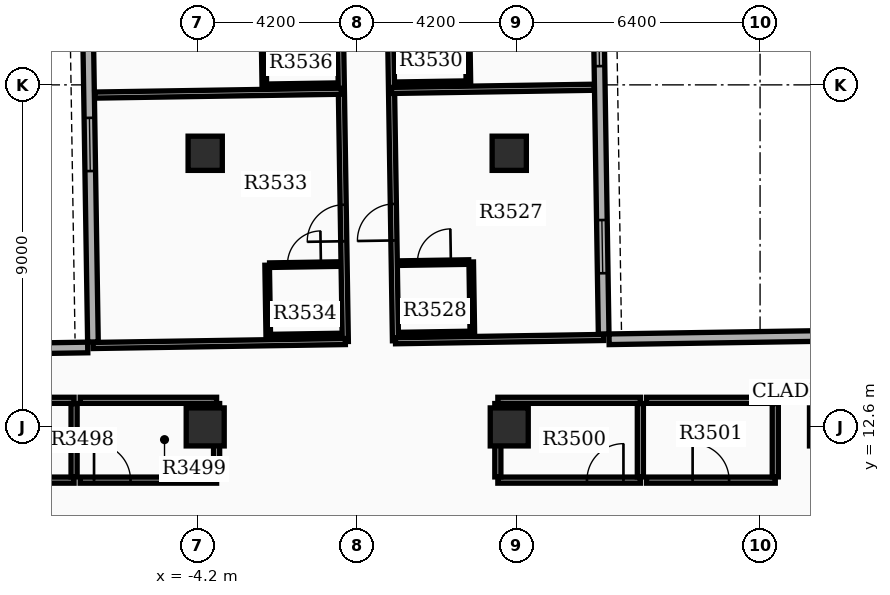
"""IFC4 building model, lengths in metres.
Left out: names, types, materials, properties, quantities, classifications, styles, units other than length and angle.
Written with IfcOpenShell. Run it as: python <this file> out.ifc"""

import sys

from ifc_helpers import new_model, si_unit, direction, frame, frame_2d, origin, origin_2d, place, context, subcontext, project, spatial, rectangle, extrude, element, fill, save


model = new_model("IFC4")
c1 = context("Model", 3, precision=1e-05, world=origin(), true_north=direction((0.0, 1.0)))
c2 = subcontext(c1, "Body", "Model", "MODEL_VIEW")
j1 = project(units=[si_unit("LENGTHUNIT", "METRE"), si_unit("PLANEANGLEUNIT", "RADIAN")], contexts=[c1])
p1 = place(None, origin())
s1 = spatial("IfcSite", under=j1, at=p1, CompositionType="ELEMENT")
p2 = place(p1, origin())
s2 = spatial("IfcBuilding", under=s1, at=p2, CompositionType="ELEMENT")
p3 = place(p2, frame((0.0, 0.0, 220.8)))
s3 = spatial("IfcBuildingStorey", under=s2, at=p3, CompositionType="ELEMENT", Elevation=220.8)
for number, where, z_axis, x_axis in (
    (1, (12.4, 12.6, 0.0), (0.0, 0.0, 1.0), (1.0, 0.0, 0.0)),
    (2, (4.0, 12.6, 0.0), (0.0, 0.0, 1.0), (1.0, 0.0, 0.0)),
    (3, (-4.0, 12.6, 0.0), (0.0, 0.0, 1.0), (1.0, 0.0, 0.0)),
):
    element("IfcColumn", number, at=place(p3, frame(where, z_axis=z_axis, x_axis=x_axis)), inside=s3, PredefinedType="COLUMN", context=c2, shape_type="SweptSolid", body=[
        extrude(rectangle(XDim=1.0, YDim=1.0, at=origin_2d()), origin(), (0.0, 0.0, 1.0), 3.9),
    ])
for number, where, z_axis, x_axis in (
    (4, (-4.0, 19.8, 0.0), (0.0, 0.0, 1.0), (1.0, 0.0, 0.0)),
    (5, (4.0, 19.8, 0.0), (0.0, 0.0, 1.0), (1.0, 0.0, 0.0)),
):
    element("IfcColumn", number, at=place(p3, frame(where, z_axis=z_axis, x_axis=x_axis)), inside=s3, PredefinedType="COLUMN", context=c2, shape_type="SweptSolid", body=[
        extrude(rectangle(XDim=0.9, YDim=0.9, at=origin_2d()), origin(), (0.0, 0.0, 1.0), 3.9),
    ])
p4 = place(p3, frame((6.485, 15.044, 0.0), z_axis=(0.0, 0.0, 1.0), x_axis=(-0.01571739401, 0.999876474133, 0.0)))
e6 = element("IfcWall", 6, at=p4, inside=s3, PredefinedType="STANDARD", context=c2, shape_type="SweptSolid", body=[
    extrude(rectangle(XDim=20.1, YDim=0.28, at=frame_2d((10.05, 0.0))), origin(), (0.0, 0.0, 1.0), 3.18),
])
p5 = place(p4, frame((1.6, 0.0, 0.8)))
e7 = element("IfcOpeningElement", 7, at=p5, cuts=e6, PredefinedType="OPENING", context=c2, shape_type="SweptSolid", body=[
    extrude(rectangle(XDim=1.4, YDim=1.6, at=frame_2d((0.7, 0.8))), frame((0.0, 0.15, 0.0), z_axis=(0.0, -1.0, 0.0), x_axis=(1.0, 0.0, 0.0)), (0.0, 0.0, 1.0), 0.3),
])
p6 = place(p4, frame((7.05, 0.0, 0.8)))
e8 = element("IfcOpeningElement", 8, at=p6, cuts=e6, PredefinedType="OPENING", context=c2, shape_type="SweptSolid", body=[
    extrude(rectangle(XDim=1.4, YDim=1.6, at=frame_2d((0.7, 0.8))), frame((0.0, 0.15, 0.0), z_axis=(0.0, -1.0, 0.0), x_axis=(1.0, 0.0, 0.0)), (0.0, 0.0, 1.0), 0.3),
])
p7 = place(p4, frame((10.25, 0.0, 0.8)))
e9 = element("IfcOpeningElement", 9, at=p7, cuts=e6, PredefinedType="OPENING", context=c2, shape_type="SweptSolid", body=[
    extrude(rectangle(XDim=1.4, YDim=1.6, at=frame_2d((0.7, 0.8))), frame((0.0, 0.15, 0.0), z_axis=(0.0, -1.0, 0.0), x_axis=(1.0, 0.0, 0.0)), (0.0, 0.0, 1.0), 0.3),
])
p8 = place(p4, frame((14.2, 0.0, 0.8)))
e10 = element("IfcOpeningElement", 10, at=p8, cuts=e6, PredefinedType="OPENING", context=c2, shape_type="SweptSolid", body=[
    extrude(rectangle(XDim=1.4, YDim=1.6, at=frame_2d((0.7, 0.8))), frame((0.0, 0.15, 0.0), z_axis=(0.0, -1.0, 0.0), x_axis=(1.0, 0.0, 0.0)), (0.0, 0.0, 1.0), 0.3),
])
p9 = place(p3, frame((-7.27, 34.93, 0.0), z_axis=(0.0, 0.0, 1.0), x_axis=(0.015705059908, -0.999876667941, 0.0)))
e11 = element("IfcWall", 11, at=p9, inside=s3, PredefinedType="STANDARD", context=c2, shape_type="SweptSolid", body=[
    extrude(rectangle(XDim=20.1, YDim=0.28, at=frame_2d((10.05, 0.0))), origin(), (0.0, 0.0, 1.0), 3.18),
])
p10 = place(p9, frame((1.6, 0.0, 0.8)))
e12 = element("IfcOpeningElement", 12, at=p10, cuts=e11, PredefinedType="OPENING", context=c2, shape_type="SweptSolid", body=[
    extrude(rectangle(XDim=1.4, YDim=1.6, at=frame_2d((0.7, 0.8))), frame((0.0, 0.15, 0.0), z_axis=(0.0, -1.0, 0.0), x_axis=(1.0, 0.0, 0.0)), (0.0, 0.0, 1.0), 0.3),
])
p11 = place(p9, frame((7.05, 0.0, 0.8)))
e13 = element("IfcOpeningElement", 13, at=p11, cuts=e11, PredefinedType="OPENING", context=c2, shape_type="SweptSolid", body=[
    extrude(rectangle(XDim=1.4, YDim=1.6, at=frame_2d((0.7, 0.8))), frame((0.0, 0.15, 0.0), z_axis=(0.0, -1.0, 0.0), x_axis=(1.0, 0.0, 0.0)), (0.0, 0.0, 1.0), 0.3),
])
p12 = place(p9, frame((10.25, 0.0, 0.8)))
e14 = element("IfcOpeningElement", 14, at=p12, cuts=e11, PredefinedType="OPENING", context=c2, shape_type="SweptSolid", body=[
    extrude(rectangle(XDim=1.4, YDim=1.6, at=frame_2d((0.7, 0.8))), frame((0.0, 0.15, 0.0), z_axis=(0.0, -1.0, 0.0), x_axis=(1.0, 0.0, 0.0)), (0.0, 0.0, 1.0), 0.3),
])
p13 = place(p9, frame((14.2, 0.0, 0.8)))
e15 = element("IfcOpeningElement", 15, at=p13, cuts=e11, PredefinedType="OPENING", context=c2, shape_type="SweptSolid", body=[
    extrude(rectangle(XDim=1.4, YDim=1.6, at=frame_2d((0.7, 0.8))), frame((0.0, 0.15, 0.0), z_axis=(0.0, -1.0, 0.0), x_axis=(1.0, 0.0, 0.0)), (0.0, 0.0, 1.0), 0.3),
])
p14 = place(p3, frame((12.926, 15.005, 0.0), z_axis=(0.0, 0.0, 1.0), x_axis=(-0.999876823822, -0.015695132501, 0.0)))
e16 = element("IfcWall", 16, at=p14, inside=s3, PredefinedType="STANDARD", context=c2, shape_type="SweptSolid", body=[
    extrude(rectangle(XDim=6.3, YDim=0.28, at=frame_2d((3.15, 0.0))), origin(), (0.0, 0.0, 1.0), 3.18),
])
p15 = place(p3, frame((-13.391, 14.592, 0.0), z_axis=(0.0, 0.0, 1.0), x_axis=(0.999876833368, 0.015694524359, 0.0)))
e17 = element("IfcWall", 17, at=p15, inside=s3, PredefinedType="STANDARD", context=c2, shape_type="SweptSolid", body=[
    extrude(rectangle(XDim=6.3, YDim=0.28, at=frame_2d((3.15, 0.0))), origin(), (0.0, 0.0, 1.0), 3.18),
])
p16 = place(p3, frame((-11.0, 11.2, 0.0), z_axis=(0.0, 0.0, 1.0), x_axis=(1.0, 0.0, 0.0)))
e18 = element("IfcWall", 18, at=p16, inside=s3, PredefinedType="PARTITIONING", context=c2, shape_type="SweptSolid", body=[
    extrude(rectangle(XDim=3.55, YDim=0.16, at=frame_2d((1.775, 0.0))), origin(), (0.0, 0.0, 1.0), 3.17),
])
p17 = place(p16, frame((1.295, 0.0, 0.0)))
e19 = element("IfcOpeningElement", 19, at=p17, cuts=e18, PredefinedType="OPENING", context=c2, shape_type="SweptSolid", body=[
    extrude(rectangle(XDim=0.96, YDim=2.15, at=frame_2d((0.48, 1.075))), frame((0.0, 0.09, 0.0), z_axis=(0.0, -1.0, 0.0), x_axis=(1.0, 0.0, 0.0)), (0.0, 0.0, 1.0), 0.18),
])
p18 = place(p3, frame((-11.0, 13.3, 0.0), z_axis=(0.0, 0.0, 1.0), x_axis=(1.0, 0.0, 0.0)))
e20 = element("IfcWall", 20, at=p18, inside=s3, PredefinedType="PARTITIONING", context=c2, shape_type="SweptSolid", body=[
    extrude(rectangle(XDim=3.55, YDim=0.16, at=frame_2d((1.775, 0.0))), origin(), (0.0, 0.0, 1.0), 3.17),
])
p19 = place(p3, frame((-7.45, 11.285, 0.0), z_axis=(0.0, 0.0, 1.0), x_axis=(0.0, 1.0, 0.0)))
e21 = element("IfcWall", 21, at=p19, inside=s3, PredefinedType="PARTITIONING", context=c2, shape_type="SweptSolid", body=[
    extrude(rectangle(XDim=1.93, YDim=0.16, at=frame_2d((0.965, 0.0))), origin(), (0.0, 0.0, 1.0), 3.17),
])
p20 = place(p3, frame((-7.29, 11.2, 0.0), z_axis=(0.0, 0.0, 1.0), x_axis=(1.0, 0.0, 0.0)))
e22 = element("IfcWall", 22, at=p20, inside=s3, PredefinedType="PARTITIONING", context=c2, shape_type="SweptSolid", body=[
    extrude(rectangle(XDim=3.59, YDim=0.16, at=frame_2d((1.795, 0.0))), origin(), (0.0, 0.0, 1.0), 3.17),
])
p21 = place(p20, frame((0.365, 0.0, 0.0)))
e23 = element("IfcOpeningElement", 23, at=p21, cuts=e22, PredefinedType="OPENING", context=c2, shape_type="SweptSolid", body=[
    extrude(rectangle(XDim=0.96, YDim=2.15, at=frame_2d((0.48, 1.075))), frame((0.0, 0.09, 0.0), z_axis=(0.0, -1.0, 0.0), x_axis=(1.0, 0.0, 0.0)), (0.0, 0.0, 1.0), 0.18),
])
p22 = place(p3, frame((-7.29, 13.3, 0.0), z_axis=(0.0, 0.0, 1.0), x_axis=(1.0, 0.0, 0.0)))
e24 = element("IfcWall", 24, at=p22, inside=s3, PredefinedType="PARTITIONING", context=c2, shape_type="SweptSolid", body=[
    extrude(rectangle(XDim=3.59, YDim=0.16, at=frame_2d((1.795, 0.0))), origin(), (0.0, 0.0, 1.0), 3.17),
])
p23 = place(p3, frame((-3.7, 11.285, 0.0), z_axis=(0.0, 0.0, 1.0), x_axis=(0.0, 1.0, 0.0)))
e25 = element("IfcWall", 25, at=p23, inside=s3, PredefinedType="PARTITIONING", context=c2, shape_type="SweptSolid", body=[
    extrude(rectangle(XDim=1.93, YDim=0.16, at=frame_2d((0.965, 0.0))), origin(), (0.0, 0.0, 1.0), 3.17),
])
p24 = place(p3, frame((3.7, 11.2, 0.0), z_axis=(0.0, 0.0, 1.0), x_axis=(1.0, 0.0, 0.0)))
e26 = element("IfcWall", 26, at=p24, inside=s3, PredefinedType="PARTITIONING", context=c2, shape_type="SweptSolid", body=[
    extrude(rectangle(XDim=3.75, YDim=0.16, at=frame_2d((1.875, 0.0))), origin(), (0.0, 0.0, 1.0), 3.17),
])
p25 = place(p24, frame((2.345, 0.0, 0.0)))
e27 = element("IfcOpeningElement", 27, at=p25, cuts=e26, PredefinedType="OPENING", context=c2, shape_type="SweptSolid", body=[
    extrude(rectangle(XDim=0.96, YDim=2.15, at=frame_2d((0.48, 1.075))), frame((0.0, 0.09, 0.0), z_axis=(0.0, -1.0, 0.0), x_axis=(1.0, 0.0, 0.0)), (0.0, 0.0, 1.0), 0.18),
])
p26 = place(p3, frame((3.7, 13.3, 0.0), z_axis=(0.0, 0.0, 1.0), x_axis=(1.0, 0.0, 0.0)))
e28 = element("IfcWall", 28, at=p26, inside=s3, PredefinedType="PARTITIONING", context=c2, shape_type="SweptSolid", body=[
    extrude(rectangle(XDim=3.75, YDim=0.16, at=frame_2d((1.875, 0.0))), origin(), (0.0, 0.0, 1.0), 3.17),
])
for number, where, z_axis, x_axis in (
    (29, (3.7, 11.285, 0.0), (0.0, 0.0, 1.0), (0.0, 1.0, 0.0)),
    (30, (7.45, 11.285, 0.0), (0.0, 0.0, 1.0), (0.0, 1.0, 0.0)),
):
    element("IfcWall", number, at=place(p3, frame(where, z_axis=z_axis, x_axis=x_axis)), inside=s3, PredefinedType="PARTITIONING", context=c2, shape_type="SweptSolid", body=[
        extrude(rectangle(XDim=1.93, YDim=0.16, at=frame_2d((0.965, 0.0))), origin(), (0.0, 0.0, 1.0), 3.17),
    ])
p27 = place(p3, frame((7.61, 11.2, 0.0), z_axis=(0.0, 0.0, 1.0), x_axis=(1.0, 0.0, 0.0)))
e31 = element("IfcWall", 31, at=p27, inside=s3, PredefinedType="PARTITIONING", context=c2, shape_type="SweptSolid", body=[
    extrude(rectangle(XDim=3.39, YDim=0.16, at=frame_2d((1.695, 0.0))), origin(), (0.0, 0.0, 1.0), 3.17),
])
p28 = place(p27, frame((1.215, 0.0, 0.0)))
e32 = element("IfcOpeningElement", 32, at=p28, cuts=e31, PredefinedType="OPENING", context=c2, shape_type="SweptSolid", body=[
    extrude(rectangle(XDim=0.96, YDim=2.15, at=frame_2d((0.48, 1.075))), frame((0.0, 0.09, 0.0), z_axis=(0.0, -1.0, 0.0), x_axis=(1.0, 0.0, 0.0)), (0.0, 0.0, 1.0), 0.18),
])
p29 = place(p3, frame((7.61, 13.3, 0.0), z_axis=(0.0, 0.0, 1.0), x_axis=(1.0, 0.0, 0.0)))
e33 = element("IfcWall", 33, at=p29, inside=s3, PredefinedType="PARTITIONING", context=c2, shape_type="SweptSolid", body=[
    extrude(rectangle(XDim=3.39, YDim=0.16, at=frame_2d((1.695, 0.0))), origin(), (0.0, 0.0, 1.0), 3.17),
])
p30 = place(p3, frame((11.0, 11.285, 0.0), z_axis=(0.0, 0.0, 1.0), x_axis=(0.0, 1.0, 0.0)))
e34 = element("IfcWall", 34, at=p30, inside=s3, PredefinedType="PARTITIONING", context=c2, shape_type="SweptSolid", body=[
    extrude(rectangle(XDim=1.93, YDim=0.16, at=frame_2d((0.965, 0.0))), origin(), (0.0, 0.0, 1.0), 3.17),
])
p31 = place(p3, frame((1.007, 14.868, 0.0), z_axis=(0.0, 0.0, 1.0), x_axis=(-0.015701893165, 0.999876717676, 0.0)))
e35 = element("IfcWall", 35, at=p31, inside=s3, PredefinedType="PARTITIONING", context=c2, shape_type="SweptSolid", body=[
    extrude(rectangle(XDim=20.182, YDim=0.16, at=frame_2d((10.091, 0.0))), origin(), (0.0, 0.0, 1.0), 3.17),
])
p32 = place(p31, frame((2.639, 0.0, 0.0)))
e36 = element("IfcOpeningElement", 36, at=p32, cuts=e35, PredefinedType="OPENING", context=c2, shape_type="SweptSolid", body=[
    extrude(rectangle(XDim=0.96, YDim=2.15, at=frame_2d((0.48, 1.075))), frame((0.0, 0.09, 0.0), z_axis=(0.0, -1.0, 0.0), x_axis=(1.0, 0.0, 0.0)), (0.0, 0.0, 1.0), 0.18),
])
p33 = place(p31, frame((9.273, 0.0, 0.0)))
e37 = element("IfcOpeningElement", 37, at=p33, cuts=e35, PredefinedType="OPENING", context=c2, shape_type="SweptSolid", body=[
    extrude(rectangle(XDim=0.96, YDim=2.15, at=frame_2d((0.48, 1.075))), frame((0.0, 0.09, 0.0), z_axis=(0.0, -1.0, 0.0), x_axis=(1.0, 0.0, 0.0)), (0.0, 0.0, 1.0), 0.18),
])
p34 = place(p31, frame((16.614, 0.0, 0.0)))
e38 = element("IfcOpeningElement", 38, at=p34, cuts=e35, PredefinedType="OPENING", context=c2, shape_type="SweptSolid", body=[
    extrude(rectangle(XDim=0.96, YDim=2.15, at=frame_2d((0.48, 1.075))), frame((0.0, 0.09, 0.0), z_axis=(0.0, -1.0, 0.0), x_axis=(1.0, 0.0, 0.0)), (0.0, 0.0, 1.0), 0.18),
])
p35 = place(p3, frame((1.007, 14.868, 0.0), z_axis=(0.0, 0.0, 1.0), x_axis=(0.999877025973, 0.015682248948, 0.0)))
e39 = element("IfcWall", 39, at=p35, inside=s3, PredefinedType="PARTITIONING", context=c2, shape_type="SweptSolid", body=[
    extrude(rectangle(XDim=5.48, YDim=0.16, at=frame_2d((2.74, 0.0))), origin(), (0.0, 0.0, 1.0), 3.17),
])
p36 = place(p3, frame((0.903, 21.454, 0.0), z_axis=(0.0, 0.0, 1.0), x_axis=(0.999876674701, 0.015704629518, 0.0)))
e40 = element("IfcWall", 40, at=p36, inside=s3, PredefinedType="PARTITIONING", context=c2, shape_type="SweptSolid", body=[
    extrude(rectangle(XDim=5.332, YDim=0.16, at=frame_2d((2.666, 0.0))), origin(), (0.0, 0.0, 1.0), 3.17),
])
p37 = place(p3, frame((1.115, 16.91, 0.0), z_axis=(0.0, 0.0, 1.0), x_axis=(0.999876836305, 0.015694337248, 0.0)))
e41 = element("IfcWall", 41, at=p37, inside=s3, PredefinedType="PARTITIONING", context=c2, shape_type="SweptSolid", body=[
    extrude(rectangle(XDim=1.82, YDim=0.12, at=frame_2d((0.91, 0.0))), origin(), (0.0, 0.0, 1.0), 3.17),
])
p38 = place(p37, frame((0.47, 0.0, 0.0)))
e42 = element("IfcOpeningElement", 42, at=p38, cuts=e41, PredefinedType="OPENING", context=c2, shape_type="SweptSolid", body=[
    extrude(rectangle(XDim=0.88, YDim=2.1, at=frame_2d((0.44, 1.05))), frame((0.0, 0.07, 0.0), z_axis=(0.0, -1.0, 0.0), x_axis=(1.0, 0.0, 0.0)), (0.0, 0.0, 1.0), 0.14),
])
p39 = place(p3, frame((1.144, 15.03, 0.0), z_axis=(0.0, 0.0, 1.0), x_axis=(0.999876836305, 0.015694337248, 0.0)))
e43 = element("IfcWall", 43, at=p39, inside=s3, PredefinedType="PARTITIONING", context=c2, shape_type="SweptSolid", body=[
    extrude(rectangle(XDim=1.82, YDim=0.12, at=frame_2d((0.91, 0.0))), origin(), (0.0, 0.0, 1.0), 3.17),
])
p40 = place(p3, frame((3.029, 15.059, 0.0), z_axis=(0.0, 0.0, 1.0), x_axis=(-0.01571234584, 0.999876553475, 0.0)))
e44 = element("IfcWall", 44, at=p40, inside=s3, PredefinedType="PARTITIONING", context=c2, shape_type="SweptSolid", body=[
    extrude(rectangle(XDim=1.88, YDim=0.12, at=frame_2d((0.94, 0.0))), origin(), (0.0, 0.0, 1.0), 3.17),
])
p41 = place(p3, frame((1.041, 21.616, 0.0), z_axis=(0.0, 0.0, 1.0), x_axis=(0.999876836305, 0.015694337248, 0.0)))
e45 = element("IfcWall", 45, at=p41, inside=s3, PredefinedType="PARTITIONING", context=c2, shape_type="SweptSolid", body=[
    extrude(rectangle(XDim=1.82, YDim=0.12, at=frame_2d((0.91, 0.0))), origin(), (0.0, 0.0, 1.0), 3.17),
])
p42 = place(p3, frame((2.925, 21.646, 0.0), z_axis=(0.0, 0.0, 1.0), x_axis=(-0.01571234584, 0.999876553475, 0.0)))
e46 = element("IfcWall", 46, at=p42, inside=s3, PredefinedType="PARTITIONING", context=c2, shape_type="SweptSolid", body=[
    extrude(rectangle(XDim=1.88, YDim=0.12, at=frame_2d((0.94, 0.0))), origin(), (0.0, 0.0, 1.0), 3.17),
])
p43 = place(p3, frame((-0.313, 14.847, 0.0), z_axis=(0.0, 0.0, 1.0), x_axis=(-0.015713987169, 0.999876527681, 0.0)))
e47 = element("IfcWall", 47, at=p43, inside=s3, PredefinedType="PARTITIONING", context=c2, shape_type="SweptSolid", body=[
    extrude(rectangle(XDim=20.182, YDim=0.16, at=frame_2d((10.091, 0.0))), origin(), (0.0, 0.0, 1.0), 3.17),
])
p44 = place(p43, frame((2.639, 0.0, 0.0)))
e48 = element("IfcOpeningElement", 48, at=p44, cuts=e47, PredefinedType="OPENING", context=c2, shape_type="SweptSolid", body=[
    extrude(rectangle(XDim=0.96, YDim=2.15, at=frame_2d((0.48, 1.075))), frame((0.0, 0.09, 0.0), z_axis=(0.0, -1.0, 0.0), x_axis=(1.0, 0.0, 0.0)), (0.0, 0.0, 1.0), 0.18),
])
p45 = place(p43, frame((9.273, 0.0, 0.0)))
e49 = element("IfcOpeningElement", 49, at=p45, cuts=e47, PredefinedType="OPENING", context=c2, shape_type="SweptSolid", body=[
    extrude(rectangle(XDim=0.96, YDim=2.15, at=frame_2d((0.48, 1.075))), frame((0.0, 0.09, 0.0), z_axis=(0.0, -1.0, 0.0), x_axis=(1.0, 0.0, 0.0)), (0.0, 0.0, 1.0), 0.18),
])
p46 = place(p43, frame((16.614, 0.0, 0.0)))
e50 = element("IfcOpeningElement", 50, at=p46, cuts=e47, PredefinedType="OPENING", context=c2, shape_type="SweptSolid", body=[
    extrude(rectangle(XDim=0.96, YDim=2.15, at=frame_2d((0.48, 1.075))), frame((0.0, 0.09, 0.0), z_axis=(0.0, -1.0, 0.0), x_axis=(1.0, 0.0, 0.0)), (0.0, 0.0, 1.0), 0.18),
])
p47 = place(p3, frame((-0.313, 14.847, 0.0), z_axis=(0.0, 0.0, 1.0), x_axis=(-0.999876746497, -0.015700057761, 0.0)))
e51 = element("IfcWall", 51, at=p47, inside=s3, PredefinedType="PARTITIONING", context=c2, shape_type="SweptSolid", body=[
    extrude(rectangle(XDim=6.64, YDim=0.16, at=frame_2d((3.32, 0.0))), origin(), (0.0, 0.0, 1.0), 3.17),
])
p48 = place(p3, frame((-0.417, 21.433, 0.0), z_axis=(0.0, 0.0, 1.0), x_axis=(-0.999876442039, -0.015719435564, 0.0)))
e52 = element("IfcWall", 52, at=p48, inside=s3, PredefinedType="PARTITIONING", context=c2, shape_type="SweptSolid", body=[
    extrude(rectangle(XDim=6.492, YDim=0.16, at=frame_2d((3.246, 0.0))), origin(), (0.0, 0.0, 1.0), 3.17),
])
p49 = place(p3, frame((-2.305, 16.856, 0.0), z_axis=(0.0, 0.0, 1.0), x_axis=(0.999876803258, 0.015696442504, 0.0)))
e53 = element("IfcWall", 53, at=p49, inside=s3, PredefinedType="PARTITIONING", context=c2, shape_type="SweptSolid", body=[
    extrude(rectangle(XDim=1.82, YDim=0.12, at=frame_2d((0.91, 0.0))), origin(), (0.0, 0.0, 1.0), 3.17),
])
p50 = place(p49, frame((0.47, 0.0, 0.0)))
e54 = element("IfcOpeningElement", 54, at=p50, cuts=e53, PredefinedType="OPENING", context=c2, shape_type="SweptSolid", body=[
    extrude(rectangle(XDim=0.88, YDim=2.1, at=frame_2d((0.44, 1.05))), frame((0.0, 0.07, 0.0), z_axis=(0.0, -1.0, 0.0), x_axis=(1.0, 0.0, 0.0)), (0.0, 0.0, 1.0), 0.14),
])
p51 = place(p3, frame((-2.275, 14.976, 0.0), z_axis=(0.0, 0.0, 1.0), x_axis=(0.999876803258, 0.015696442504, 0.0)))
e55 = element("IfcWall", 55, at=p51, inside=s3, PredefinedType="PARTITIONING", context=c2, shape_type="SweptSolid", body=[
    extrude(rectangle(XDim=1.82, YDim=0.12, at=frame_2d((0.91, 0.0))), origin(), (0.0, 0.0, 1.0), 3.17),
])
p52 = place(p3, frame((-2.341, 14.975, 0.0), z_axis=(0.0, 0.0, 1.0), x_axis=(-0.01571234584, 0.999876553475, 0.0)))
e56 = element("IfcWall", 56, at=p52, inside=s3, PredefinedType="PARTITIONING", context=c2, shape_type="SweptSolid", body=[
    extrude(rectangle(XDim=1.88, YDim=0.12, at=frame_2d((0.94, 0.0))), origin(), (0.0, 0.0, 1.0), 3.17),
])
p53 = place(p3, frame((-2.379, 21.562, 0.0), z_axis=(0.0, 0.0, 1.0), x_axis=(0.999876836305, 0.015694337248, 0.0)))
e57 = element("IfcWall", 57, at=p53, inside=s3, PredefinedType="PARTITIONING", context=c2, shape_type="SweptSolid", body=[
    extrude(rectangle(XDim=1.82, YDim=0.12, at=frame_2d((0.91, 0.0))), origin(), (0.0, 0.0, 1.0), 3.17),
])
p54 = place(p3, frame((-2.444, 21.561, 0.0), z_axis=(0.0, 0.0, 1.0), x_axis=(-0.01558454688, 0.999878553575, 0.0)))
e58 = element("IfcWall", 58, at=p54, inside=s3, PredefinedType="PARTITIONING", context=c2, shape_type="SweptSolid", body=[
    extrude(rectangle(XDim=1.88, YDim=0.12, at=frame_2d((0.94, 0.0))), origin(), (0.0, 0.0, 1.0), 3.17),
])
p55 = place(p5, origin())
e59 = element("IfcWindow", 59, at=p55, inside=s3, PartitioningType="SINGLE_PANEL", PredefinedType="WINDOW", context=c2, shape_type="SweptSolid", body=[
    extrude(rectangle(XDim=1.4, YDim=1.6, at=frame_2d((0.7, 0.8))), frame((0.0, 0.03, 0.0), z_axis=(0.0, -1.0, 0.0), x_axis=(1.0, 0.0, 0.0)), (0.0, 0.0, 1.0), 0.06),
])
fill(e7, e59)
p56 = place(p6, origin())
e60 = element("IfcWindow", 60, at=p56, inside=s3, PartitioningType="SINGLE_PANEL", PredefinedType="WINDOW", context=c2, shape_type="SweptSolid", body=[
    extrude(rectangle(XDim=1.4, YDim=1.6, at=frame_2d((0.7, 0.8))), frame((0.0, 0.03, 0.0), z_axis=(0.0, -1.0, 0.0), x_axis=(1.0, 0.0, 0.0)), (0.0, 0.0, 1.0), 0.06),
])
fill(e8, e60)
p57 = place(p13, origin())
e61 = element("IfcWindow", 61, at=p57, inside=s3, PartitioningType="SINGLE_PANEL", PredefinedType="WINDOW", context=c2, shape_type="SweptSolid", body=[
    extrude(rectangle(XDim=1.4, YDim=1.6, at=frame_2d((0.7, 0.8))), frame((0.0, 0.03, 0.0), z_axis=(0.0, -1.0, 0.0), x_axis=(1.0, 0.0, 0.0)), (0.0, 0.0, 1.0), 0.06),
])
fill(e15, e61)
p58 = place(p21, origin())
e62 = element("IfcDoor", 62, at=p58, inside=s3, OperationType="SINGLE_SWING_LEFT", PredefinedType="DOOR", context=c2, shape_type="SweptSolid", body=[
    extrude(rectangle(XDim=0.96, YDim=2.15, at=frame_2d((0.48, 1.075))), frame((0.0, 0.025, 0.0), z_axis=(0.0, -1.0, 0.0), x_axis=(1.0, 0.0, 0.0)), (0.0, 0.0, 1.0), 0.05),
])
fill(e23, e62)
p59 = place(p25, origin())
e63 = element("IfcDoor", 63, at=p59, inside=s3, OperationType="SINGLE_SWING_RIGHT", PredefinedType="DOOR", context=c2, shape_type="SweptSolid", body=[
    extrude(rectangle(XDim=0.96, YDim=2.15, at=frame_2d((0.48, 1.075))), frame((0.0, 0.025, 0.0), z_axis=(0.0, -1.0, 0.0), x_axis=(1.0, 0.0, 0.0)), (0.0, 0.0, 1.0), 0.05),
])
fill(e27, e63)
p60 = place(p28, origin())
e64 = element("IfcDoor", 64, at=p60, inside=s3, OperationType="SINGLE_SWING_LEFT", PredefinedType="DOOR", context=c2, shape_type="SweptSolid", body=[
    extrude(rectangle(XDim=0.96, YDim=2.15, at=frame_2d((0.48, 1.075))), frame((0.0, 0.025, 0.0), z_axis=(0.0, -1.0, 0.0), x_axis=(1.0, 0.0, 0.0)), (0.0, 0.0, 1.0), 0.05),
])
fill(e32, e64)
p61 = place(p32, origin())
e65 = element("IfcDoor", 65, at=p61, inside=s3, OperationType="SINGLE_SWING_LEFT", PredefinedType="DOOR", context=c2, shape_type="SweptSolid", body=[
    extrude(rectangle(XDim=0.96, YDim=2.15, at=frame_2d((0.48, 1.075))), frame((0.0, 0.025, 0.0), z_axis=(0.0, -1.0, 0.0), x_axis=(1.0, 0.0, 0.0)), (0.0, 0.0, 1.0), 0.05),
])
fill(e36, e65)
p62 = place(p38, origin())
e66 = element("IfcDoor", 66, at=p62, inside=s3, OperationType="SINGLE_SWING_RIGHT", PredefinedType="DOOR", context=c2, shape_type="SweptSolid", body=[
    extrude(rectangle(XDim=0.88, YDim=2.1, at=frame_2d((0.44, 1.05))), frame((0.0, 0.025, 0.0), z_axis=(0.0, -1.0, 0.0), x_axis=(1.0, 0.0, 0.0)), (0.0, 0.0, 1.0), 0.05),
])
fill(e42, e66)
p63 = place(p44, origin())
e67 = element("IfcDoor", 67, at=p63, inside=s3, OperationType="SINGLE_SWING_LEFT", PredefinedType="DOOR", context=c2, shape_type="SweptSolid", body=[
    extrude(rectangle(XDim=0.96, YDim=2.15, at=frame_2d((0.48, 1.075))), frame((0.0, 0.025, 0.0), z_axis=(0.0, -1.0, 0.0), x_axis=(1.0, 0.0, 0.0)), (0.0, 0.0, 1.0), 0.05),
])
fill(e48, e67)
p64 = place(p50, origin())
e68 = element("IfcDoor", 68, at=p64, inside=s3, OperationType="SINGLE_SWING_RIGHT", PredefinedType="DOOR", context=c2, shape_type="SweptSolid", body=[
    extrude(rectangle(XDim=0.88, YDim=2.1, at=frame_2d((0.44, 1.05))), frame((0.0, 0.025, 0.0), z_axis=(0.0, -1.0, 0.0), x_axis=(1.0, 0.0, 0.0)), (0.0, 0.0, 1.0), 0.05),
])
fill(e54, e68)
save(model, sys.argv[1])
